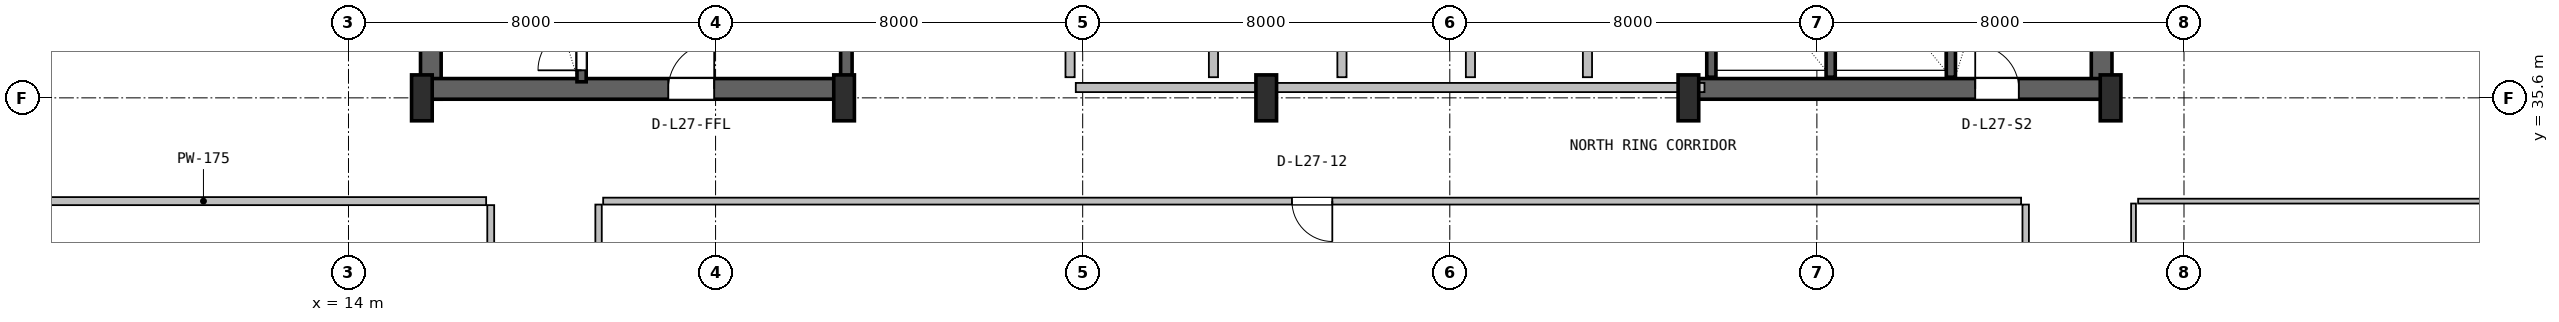
"""IFC4 building model, lengths in metres.
Left out: names, types, materials, properties, quantities, classifications, styles, units other than length and angle.
Written with IfcOpenShell. Run it as: python <this file> out.ifc"""

import sys

from ifc_helpers import new_model, si_unit, direction, frame, frame_2d, origin, origin_2d, place, context, subcontext, project, spatial, rectangle, i_section, extrude, source, transform, mapped, element, fill, save


model = new_model("IFC4")
c1 = context("Model", 3, precision=1e-05, world=origin(), true_north=direction((0.0, 1.0)))
c2 = subcontext(c1, "Body", "Model", "MODEL_VIEW")
j1 = project(units=[si_unit("LENGTHUNIT", "METRE"), si_unit("PLANEANGLEUNIT", "RADIAN")], contexts=[c1])
p1 = place(None, origin())
s1 = spatial("IfcSite", under=j1, at=p1, CompositionType="ELEMENT")
p2 = place(p1, origin())
s2 = spatial("IfcBuilding", under=s1, at=p2, CompositionType="ELEMENT")
p3 = place(p2, frame((0.0, 0.0, 114.4)))
s3 = spatial("IfcBuildingStorey", under=s2, at=p3, CompositionType="ELEMENT", Elevation=114.4)
for number, where, z_axis, x_axis in (
    (1, (15.795, 35.57, 0.0), (0.0, 0.0, 1.0), (0.0, 1.0, 0.0)),
    (2, (52.205, 35.57, 0.0), (0.0, 0.0, 1.0), (0.0, 1.0, 0.0)),
):
    element("IfcWall", number, at=place(p3, frame(where, z_axis=z_axis, x_axis=x_axis)), inside=s3, PredefinedType="SHEAR", context=c2, shape_type="SweptSolid", body=[
        extrude(rectangle(XDim=11.23, YDim=0.45, at=frame_2d((5.615, 0.0))), origin(), (0.0, 0.0, 1.0), 3.55),
    ])
p4 = place(p3, frame((15.57, 35.795, 0.0), z_axis=(0.0, 0.0, 1.0), x_axis=(1.0, 0.0, 0.0)))
e3 = element("IfcWall", 3, at=p4, inside=s3, PredefinedType="SHEAR", context=c2, shape_type="SweptSolid", body=[
    extrude(rectangle(XDim=9.23, YDim=0.45, at=frame_2d((4.615, 0.0))), origin(), (0.0, 0.0, 1.0), 3.55),
])
p5 = place(p4, frame((5.4, 0.0, 0.0)))
e4 = element("IfcOpeningElement", 4, at=p5, cuts=e3, PredefinedType="OPENING", context=c2, shape_type="SweptSolid", body=[
    extrude(rectangle(XDim=1.0, YDim=2.1, at=frame_2d((0.5, 1.05))), frame((0.0, 0.235, 0.0), z_axis=(0.0, -1.0, 0.0), x_axis=(1.0, 0.0, 0.0)), (0.0, 0.0, 1.0), 0.47),
])
p6 = place(p3, frame((43.2, 35.795, 0.0), z_axis=(0.0, 0.0, 1.0), x_axis=(1.0, 0.0, 0.0)))
e5 = element("IfcWall", 5, at=p6, inside=s3, PredefinedType="SHEAR", context=c2, shape_type="SweptSolid", body=[
    extrude(rectangle(XDim=9.23, YDim=0.45, at=frame_2d((4.615, 0.0))), origin(), (0.0, 0.0, 1.0), 3.55),
])
p7 = place(p6, frame((6.25, 0.0, 0.0)))
e6 = element("IfcOpeningElement", 6, at=p7, cuts=e5, PredefinedType="OPENING", context=c2, shape_type="SweptSolid", body=[
    extrude(rectangle(XDim=0.95, YDim=2.1, at=frame_2d((0.475, 1.05))), frame((0.0, 0.235, 0.0), z_axis=(0.0, -1.0, 0.0), x_axis=(1.0, 0.0, 0.0)), (0.0, 0.0, 1.0), 0.47),
])
m1 = source(origin(), c2, "Body", "SweptSolid", [
    extrude(i_section(OverallWidth=0.45, OverallDepth=1.0, WebThickness=0.016, FlangeThickness=0.03, FilletRadius=0.016, at=origin_2d()), origin(), (0.0, 0.0, 1.0), 3.8),
])
for number, where, z_axis, x_axis in (
    (7, (15.6, 35.6, 0.0), (0.0, 0.0, 1.0), (1.0, 0.0, 0.0)),
    (8, (24.8, 35.6, 0.0), (0.0, 0.0, 1.0), (1.0, 0.0, 0.0)),
    (9, (34.0, 35.6, 0.0), (0.0, 0.0, 1.0), (1.0, 0.0, 0.0)),
    (10, (43.2, 35.6, 0.0), (0.0, 0.0, 1.0), (1.0, 0.0, 0.0)),
    (11, (52.4, 35.6, 0.0), (0.0, 0.0, 1.0), (1.0, 0.0, 0.0)),
):
    element("IfcColumn", number, at=place(p3, frame(where, z_axis=z_axis, x_axis=x_axis)), inside=s3, PredefinedType="COLUMN", context=c2, shape_type="MappedRepresentation", body=[
        mapped(m1, transform((0.0, 0.0, 0.0), x_axis=(1.0, 0.0, 0.0), y_axis=(0.0, 1.0, 0.0), z_axis=(0.0, 0.0, 1.0), scale=1.0)),
    ])
p8 = place(p3, frame((19.08, 35.95, 0.0), z_axis=(0.0, 0.0, 1.0), x_axis=(0.0, 1.0, 0.0)))
e12 = element("IfcWall", 12, at=p8, inside=s3, PredefinedType="SHEAR", context=c2, shape_type="SweptSolid", body=[
    extrude(rectangle(XDim=9.65, YDim=0.2, at=frame_2d((4.825, 0.0))), origin(), (0.0, 0.0, 1.0), 3.55),
])
p9 = place(p8, frame((0.25, 0.0, 0.0)))
e13 = element("IfcOpeningElement", 13, at=p9, cuts=e12, PredefinedType="OPENING", context=c2, shape_type="SweptSolid", body=[
    extrude(rectangle(XDim=0.95, YDim=2.1, at=frame_2d((0.475, 1.05))), frame((0.0, 0.11, 0.0), z_axis=(0.0, -1.0, 0.0), x_axis=(1.0, 0.0, 0.0)), (0.0, 0.0, 1.0), 0.22),
])
p10 = place(p3, frame((24.85, 36.05, 0.0), z_axis=(0.0, 0.0, 1.0), x_axis=(0.0, 1.0, 0.0)))
e14 = element("IfcWall", 14, at=p10, inside=s3, PredefinedType="SHEAR", context=c2, shape_type="SweptSolid", body=[
    extrude(rectangle(XDim=10.45, YDim=0.25, at=frame_2d((5.225, 0.0))), origin(), (0.0, 0.0, 1.0), 3.55),
])
p11 = place(p3, frame((48.92, 36.05, 0.0), z_axis=(0.0, 0.0, 1.0), x_axis=(0.0, 1.0, 0.0)))
e15 = element("IfcWall", 15, at=p11, inside=s3, PredefinedType="SHEAR", context=c2, shape_type="SweptSolid", body=[
    extrude(rectangle(XDim=10.5, YDim=0.2, at=frame_2d((5.25, 0.0))), origin(), (0.0, 0.0, 1.0), 3.55),
])
for number, where, z_axis, x_axis in (
    (16, (43.7, 36.05, 0.0), (0.0, 0.0, 1.0), (0.0, 1.0, 0.0)),
    (17, (46.3, 36.05, 0.0), (0.0, 0.0, 1.0), (0.0, 1.0, 0.0)),
):
    element("IfcWall", number, at=place(p3, frame(where, z_axis=z_axis, x_axis=x_axis)), inside=s3, PredefinedType="SHEAR", context=c2, shape_type="SweptSolid", body=[
        extrude(rectangle(XDim=3.05, YDim=0.2, at=frame_2d((1.525, 0.0))), origin(), (0.0, 0.0, 1.0), 3.55),
    ])
p12 = place(p3, frame((29.85, 35.825, 0.0), z_axis=(0.0, 0.0, 1.0), x_axis=(1.0, 0.0, 0.0)))
e18 = element("IfcWall", 18, at=p12, inside=s3, PredefinedType="SOLIDWALL", context=c2, shape_type="SweptSolid", body=[
    extrude(rectangle(XDim=13.7, YDim=0.2, at=frame_2d((6.85, 0.0))), origin(), (0.0, 0.0, 1.0), 2.325),
])
for number, where, z_axis, x_axis in (
    (19, (32.85, 36.05, 0.0), (0.0, 0.0, 1.0), (0.0, 1.0, 0.0)),
    (20, (29.725, 36.05, 0.0), (0.0, 0.0, 1.0), (0.0, 1.0, 0.0)),
    (21, (35.65, 36.05, 0.0), (0.0, 0.0, 1.0), (0.0, 1.0, 0.0)),
    (22, (38.45, 36.05, 0.0), (0.0, 0.0, 1.0), (0.0, 1.0, 0.0)),
):
    element("IfcWall", number, at=place(p3, frame(where, z_axis=z_axis, x_axis=x_axis)), inside=s3, PredefinedType="PLUMBINGWALL", context=c2, shape_type="SweptSolid", body=[
        extrude(rectangle(XDim=3.1, YDim=0.2, at=frame_2d((1.55, 0.0))), origin(), (0.0, 0.0, 1.0), 3.53),
    ])
p13 = place(p3, frame((41.0, 36.05, 0.0), z_axis=(0.0, 0.0, 1.0), x_axis=(0.0, 1.0, 0.0)))
e23 = element("IfcWall", 23, at=p13, inside=s3, PredefinedType="SOLIDWALL", context=c2, shape_type="SweptSolid", body=[
    extrude(rectangle(XDim=3.1, YDim=0.2, at=frame_2d((1.55, 0.0))), origin(), (0.0, 0.0, 1.0), 3.53),
])
p14 = place(p3, frame((17.1, 12.533, 0.0), z_axis=(0.0, 0.0, 1.0), x_axis=(0.0, 1.0, 0.0)))
e24 = element("IfcWall", 24, at=p14, inside=s3, PredefinedType="PARTITIONING", context=c2, shape_type="SweptSolid", body=[
    extrude(rectangle(XDim=20.73, YDim=0.15, at=frame_2d((10.365, 0.0))), origin(), (0.0, 0.0, 1.0), 3.222),
])
p15 = place(p14, frame((5.427, 0.0, 0.0)))
e25 = element("IfcOpeningElement", 25, at=p15, cuts=e24, PredefinedType="OPENING", context=c2, shape_type="SweptSolid", body=[
    extrude(rectangle(XDim=0.92, YDim=2.08, at=frame_2d((0.46, 1.04))), frame((0.0, 0.085, 0.0), z_axis=(0.0, -1.0, 0.0), x_axis=(1.0, 0.0, 0.0)), (0.0, 0.0, 1.0), 0.17),
])
p16 = place(p14, frame((15.797, 0.0, 0.0)))
e26 = element("IfcOpeningElement", 26, at=p16, cuts=e24, PredefinedType="OPENING", context=c2, shape_type="SweptSolid", body=[
    extrude(rectangle(XDim=1.05, YDim=2.1, at=frame_2d((0.525, 1.05))), frame((0.0, 0.085, 0.0), z_axis=(0.0, -1.0, 0.0), x_axis=(1.0, 0.0, 0.0)), (0.0, 0.0, 1.0), 0.17),
])
p17 = place(p3, frame((4.68, 33.35, 0.0), z_axis=(0.0, 0.0, 1.0), x_axis=(1.0, 0.0, 0.0)))
e27 = element("IfcWall", 27, at=p17, inside=s3, PredefinedType="PARTITIONING", context=c2, shape_type="SweptSolid", body=[
    extrude(rectangle(XDim=12.32, YDim=0.175, at=frame_2d((6.16, 0.0))), origin(), (0.0, 0.0, 1.0), 3.108),
])
for number, where, z_axis, x_axis in (
    (28, (50.55, 14.9, 0.0), (0.0, 0.0, 1.0), (0.0, 1.0, 0.0)),
    (29, (19.45, 14.9, 0.0), (0.0, 0.0, 1.0), (0.0, 1.0, 0.0)),
):
    element("IfcWall", number, at=place(p3, frame(where, z_axis=z_axis, x_axis=x_axis)), inside=s3, PredefinedType="PARTITIONING", context=c2, shape_type="SweptSolid", body=[
        extrude(rectangle(XDim=18.375, YDim=0.14, at=frame_2d((9.188, 0.0))), origin(), (0.0, 0.0, 1.0), 3.222),
    ])
p18 = place(p3, frame((19.55, 33.35, 0.0), z_axis=(0.0, 0.0, 1.0), x_axis=(1.0, 0.0, 0.0)))
e30 = element("IfcWall", 30, at=p18, inside=s3, PredefinedType="PARTITIONING", context=c2, shape_type="SweptSolid", body=[
    extrude(rectangle(XDim=30.9, YDim=0.15, at=frame_2d((15.45, 0.0))), origin(), (0.0, 0.0, 1.0), 2.83),
])
p19 = place(p18, frame((15.01, 0.0, 0.0)))
e31 = element("IfcOpeningElement", 31, at=p19, cuts=e30, PredefinedType="OPENING", context=c2, shape_type="SweptSolid", body=[
    extrude(rectangle(XDim=0.88, YDim=2.06, at=frame_2d((0.44, 1.03))), frame((0.0, 0.085, 0.0), z_axis=(0.0, -1.0, 0.0), x_axis=(1.0, 0.0, 0.0)), (0.0, 0.0, 1.0), 0.17),
])
p20 = place(p3, frame((53.0, 33.35, 0.0), z_axis=(0.0, 0.0, 1.0), x_axis=(1.0, 0.0, 0.0)))
e32 = element("IfcWall", 32, at=p20, inside=s3, PredefinedType="PARTITIONING", context=c2, shape_type="SweptSolid", body=[
    extrude(rectangle(XDim=10.32, YDim=0.105, at=frame_2d((5.16, 0.0))), origin(), (0.0, 0.0, 1.0), 3.108),
])
p21 = place(p3, frame((52.9, 12.533, 0.0), z_axis=(0.0, 0.0, 1.0), x_axis=(0.0, 1.0, 0.0)))
e33 = element("IfcWall", 33, at=p21, inside=s3, PredefinedType="PARTITIONING", context=c2, shape_type="SweptSolid", body=[
    extrude(rectangle(XDim=20.764, YDim=0.105, at=frame_2d((10.382, 0.0))), origin(), (0.0, 0.0, 1.0), 3.222),
])
p22 = place(p21, frame((9.942, 0.0, 0.0)))
e34 = element("IfcOpeningElement", 34, at=p22, cuts=e33, PredefinedType="OPENING", context=c2, shape_type="SweptSolid", body=[
    extrude(rectangle(XDim=0.88, YDim=2.06, at=frame_2d((0.44, 1.03))), frame((0.0, 0.062, 0.0), z_axis=(0.0, -1.0, 0.0), x_axis=(1.0, 0.0, 0.0)), (0.0, 0.0, 1.0), 0.125),
])
m2 = source(origin(), c2, "Body", "SweptSolid", [
    extrude(rectangle(XDim=0.95, YDim=2.1, at=frame_2d((0.475, 1.05))), frame((0.0, 0.025, 0.0), z_axis=(0.0, -1.0, 0.0), x_axis=(1.0, 0.0, 0.0)), (0.0, 0.0, 1.0), 0.05),
])
p23 = place(p9, origin())
e35 = element("IfcDoor", 35, at=p23, inside=s3, OperationType="SINGLE_SWING_LEFT", PredefinedType="DOOR", context=c2, shape_type="MappedRepresentation", body=[
    mapped(m2, transform((0.0, 0.0, 0.0), x_axis=(1.0, 0.0, 0.0), y_axis=(0.0, 1.0, 0.0), z_axis=(0.0, 0.0, 1.0), scale=1.0)),
])
fill(e13, e35)
m3 = source(origin(), c2, "Body", "SweptSolid", [
    extrude(rectangle(XDim=1.0, YDim=2.1, at=frame_2d((0.5, 1.05))), frame((0.0, 0.025, 0.0), z_axis=(0.0, -1.0, 0.0), x_axis=(1.0, 0.0, 0.0)), (0.0, 0.0, 1.0), 0.05),
])
p24 = place(p5, origin())
e36 = element("IfcDoor", 36, at=p24, inside=s3, OperationType="SINGLE_SWING_RIGHT", PredefinedType="DOOR", context=c2, shape_type="MappedRepresentation", body=[
    mapped(m3, transform((0.0, 0.0, 0.0), x_axis=(1.0, 0.0, 0.0), y_axis=(0.0, 1.0, 0.0), z_axis=(0.0, 0.0, 1.0), scale=1.0)),
])
fill(e4, e36)
p25 = place(p7, origin())
e37 = element("IfcDoor", 37, at=p25, inside=s3, OperationType="SINGLE_SWING_LEFT", PredefinedType="DOOR", context=c2, shape_type="MappedRepresentation", body=[
    mapped(m2, transform((0.0, 0.0, 0.0), x_axis=(1.0, 0.0, 0.0), y_axis=(0.0, 1.0, 0.0), z_axis=(0.0, 0.0, 1.0), scale=1.0)),
])
fill(e6, e37)
m4 = source(origin(), c2, "Body", "SweptSolid", [
    extrude(rectangle(XDim=0.88, YDim=2.06, at=frame_2d((0.44, 1.03))), frame((0.0, 0.025, 0.0), z_axis=(0.0, -1.0, 0.0), x_axis=(1.0, 0.0, 0.0)), (0.0, 0.0, 1.0), 0.05),
])
p26 = place(p19, frame((0.88, 0.0, 0.0), z_axis=(0.0, 0.0, 1.0), x_axis=(-1.0, 0.0, 0.0)))
e38 = element("IfcDoor", 38, at=p26, inside=s3, OperationType="SINGLE_SWING_RIGHT", PredefinedType="DOOR", context=c2, shape_type="MappedRepresentation", body=[
    mapped(m4, transform((0.0, 0.0, 0.0), x_axis=(1.0, 0.0, 0.0), y_axis=(0.0, 1.0, 0.0), z_axis=(0.0, 0.0, 1.0), scale=1.0)),
])
fill(e31, e38)
save(model, sys.argv[1])
